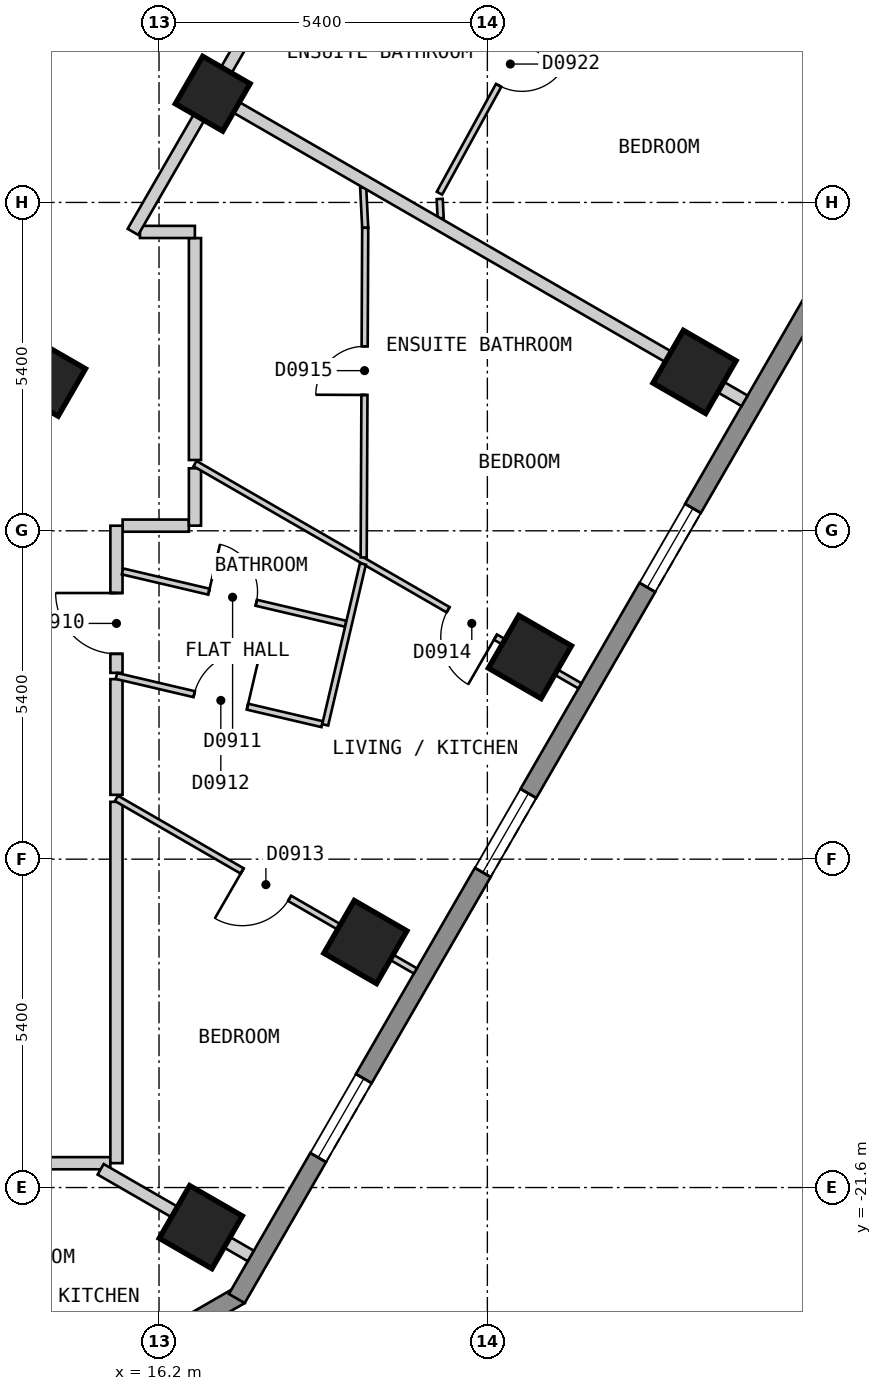
"""IFC4 building model, lengths in metres.
Left out: names, types, materials, properties, quantities, classifications, styles, units other than length and angle.
Written with IfcOpenShell. Run it as: python <this file> out.ifc"""

import sys

from ifc_helpers import new_model, si_unit, direction, frame, frame_2d, origin, origin_2d, place, context, subcontext, project, spatial, polyline, rectangle, outline, extrude, element, fill, save


model = new_model("IFC4")
c1 = context("Model", 3, precision=1e-05, world=origin(), true_north=direction((0.0, 1.0)))
c2 = subcontext(c1, "Body", "Model", "MODEL_VIEW")
j1 = project(units=[si_unit("LENGTHUNIT", "METRE"), si_unit("PLANEANGLEUNIT", "RADIAN")], contexts=[c1])
p1 = place(None, origin())
s1 = spatial("IfcSite", under=j1, at=p1, CompositionType="ELEMENT")
p2 = place(p1, origin())
s2 = spatial("IfcBuilding", under=s1, at=p2, CompositionType="ELEMENT")
p3 = place(p2, frame((0.0, 0.0, 102.0)))
s3 = spatial("IfcBuildingStorey", under=s2, at=p3, CompositionType="ELEMENT", Elevation=102.0)
for number, where, z_axis, x_axis in (
    (1, (16.887, -22.251, 0.0), (0.0, 0.0, 1.0), (0.5, 0.866, 0.0)),
    (2, (19.594, -17.563, 0.0), (0.0, 0.0, 1.0), (0.5, 0.866, 0.0)),
    (3, (22.3, -12.875, 0.0), (0.0, 0.0, 1.0), (0.5, 0.866, 0.0)),
    (4, (25.007, -8.187, 0.0), (0.0, 0.0, 1.0), (0.5, 0.866, 0.0)),
):
    element("IfcColumn", number, at=place(p3, frame(where, z_axis=z_axis, x_axis=x_axis)), inside=s3, PredefinedType="COLUMN", context=c2, shape_type="SweptSolid", body=[
        extrude(rectangle(XDim=1.0, YDim=1.0, at=origin_2d()), origin(), (0.0, 0.0, 1.0), 3.0),
    ])
for number, where, z_axis, x_axis in (
    (5, (14.376, -8.3, 0.0), (0.0, 0.0, 1.0), (0.5, 0.866, 0.0)),
    (6, (17.083, -3.612, 0.0), (0.0, 0.0, 1.0), (0.5, 0.866, 0.0)),
):
    element("IfcColumn", number, at=place(p3, frame(where, z_axis=z_axis, x_axis=x_axis)), inside=s3, PredefinedType="COLUMN", context=c2, shape_type="SweptSolid", body=[
        extrude(rectangle(XDim=0.9, YDim=0.9, at=origin_2d()), origin(), (0.0, 0.0, 1.0), 3.0),
    ])
p4 = place(p3, frame((13.204, -25.87, 0.0), z_axis=(0.0, 0.0, 1.0), x_axis=(0.866010750942, 0.50002537861, 0.0)))
e7 = element("IfcWall", 7, at=p4, inside=s3, PredefinedType="SOLIDWALL", context=c2, shape_type="SweptSolid", body=[
    extrude(outline(polyline([(0.0, -0.15), (5.0, -0.15), (4.919, 0.15), (0.08, 0.15), (0.0, -0.15)])), origin(), (0.0, 0.0, 1.0), 2.7),
])
p5 = place(p4, frame((0.65, 0.0, 0.15)))
e8 = element("IfcOpeningElement", 8, at=p5, cuts=e7, PredefinedType="OPENING", context=c2, shape_type="SweptSolid", body=[
    extrude(rectangle(XDim=1.2, YDim=2.1, at=frame_2d((0.6, 1.05))), frame((0.0, 0.16, 0.0), z_axis=(0.0, -1.0, 0.0), x_axis=(1.0, 0.0, 0.0)), (0.0, 0.0, 1.0), 0.32),
])
p6 = place(p3, frame((17.479, -23.425, 0.0), z_axis=(0.0, 0.0, 1.0), x_axis=(0.500035407905, 0.866004960056, 0.0)))
e9 = element("IfcWall", 9, at=p6, inside=s3, PredefinedType="SOLIDWALL", context=c2, shape_type="SweptSolid", body=[
    extrude(outline(polyline([(0.0, -0.15), (23.094, -0.15), (23.014, 0.15), (0.08, 0.15), (0.0, -0.15)])), origin(), (0.0, 0.0, 1.0), 2.7),
])
p7 = place(p6, frame((2.677, 0.0, 0.15)))
e10 = element("IfcOpeningElement", 10, at=p7, cuts=e9, PredefinedType="OPENING", context=c2, shape_type="SweptSolid", body=[
    extrude(rectangle(XDim=1.5, YDim=2.1, at=frame_2d((0.75, 1.05))), frame((0.0, 0.16, 0.0), z_axis=(0.0, -1.0, 0.0), x_axis=(1.0, 0.0, 0.0)), (0.0, 0.0, 1.0), 0.32),
])
p8 = place(p6, frame((8.091, 0.0, 0.15)))
e11 = element("IfcOpeningElement", 11, at=p8, cuts=e9, PredefinedType="OPENING", context=c2, shape_type="SweptSolid", body=[
    extrude(rectangle(XDim=1.5, YDim=2.1, at=frame_2d((0.75, 1.05))), frame((0.0, 0.16, 0.0), z_axis=(0.0, -1.0, 0.0), x_axis=(1.0, 0.0, 0.0)), (0.0, 0.0, 1.0), 0.32),
])
p9 = place(p6, frame((13.504, 0.0, 0.15)))
e12 = element("IfcOpeningElement", 12, at=p9, cuts=e9, PredefinedType="OPENING", context=c2, shape_type="SweptSolid", body=[
    extrude(rectangle(XDim=1.5, YDim=2.1, at=frame_2d((0.75, 1.05))), frame((0.0, 0.16, 0.0), z_axis=(0.0, -1.0, 0.0), x_axis=(1.0, 0.0, 0.0)), (0.0, 0.0, 1.0), 0.32),
])
p10 = place(p6, frame((18.917, 0.0, 0.15)))
e13 = element("IfcOpeningElement", 13, at=p10, cuts=e9, PredefinedType="OPENING", context=c2, shape_type="SweptSolid", body=[
    extrude(rectangle(XDim=1.5, YDim=2.1, at=frame_2d((0.75, 1.05))), frame((0.0, 0.16, 0.0), z_axis=(0.0, -1.0, 0.0), x_axis=(1.0, 0.0, 0.0)), (0.0, 0.0, 1.0), 0.32),
])
p11 = place(p3, frame((15.5, -13.239, 0.0), z_axis=(0.0, 0.0, 1.0), x_axis=(0.0, -1.0, 0.0)))
e14 = element("IfcWall", 14, at=p11, inside=s3, PredefinedType="PARTITIONING", context=c2, shape_type="SweptSolid", body=[
    extrude(rectangle(XDim=1.903, YDim=0.2, at=frame_2d((0.952, 0.0))), origin(), (0.0, 0.0, 1.0), 2.7),
])
p12 = place(p3, frame((16.791, -5.986, 0.0), z_axis=(0.0, 0.0, 1.0), x_axis=(0.0, -1.0, 0.0)))
e15 = element("IfcWall", 15, at=p12, inside=s3, PredefinedType="PARTITIONING", context=c2, shape_type="SweptSolid", body=[
    extrude(rectangle(XDim=3.65, YDim=0.2, at=frame_2d((1.825, 0.0))), origin(), (0.0, 0.0, 1.0), 2.7),
])
p13 = place(p3, frame((15.887, -5.885, 0.0), z_axis=(0.0, 0.0, 1.0), x_axis=(1.0, 0.0, 0.0)))
e16 = element("IfcWall", 16, at=p13, inside=s3, PredefinedType="PARTITIONING", context=c2, shape_type="SweptSolid", body=[
    extrude(rectangle(XDim=0.903, YDim=0.2, at=frame_2d((0.452, 0.0))), origin(), (0.0, 0.0, 1.0), 2.7),
])
p14 = place(p3, frame((15.601, -10.715, 0.0), z_axis=(0.0, 0.0, 1.0), x_axis=(1.0, 0.0, 0.0)))
e17 = element("IfcWall", 17, at=p14, inside=s3, PredefinedType="PARTITIONING", context=c2, shape_type="SweptSolid", body=[
    extrude(rectangle(XDim=1.09, YDim=0.2, at=frame_2d((0.545, 0.0))), origin(), (0.0, 0.0, 1.0), 2.7),
])
p15 = place(p3, frame((-15.499, -21.2, 0.0), z_axis=(0.0, 0.0, 1.0), x_axis=(1.0, 0.0, 0.0)))
e18 = element("IfcWall", 18, at=p15, inside=s3, PredefinedType="PARTITIONING", context=c2, shape_type="SweptSolid", body=[
    extrude(rectangle(XDim=30.898, YDim=0.2, at=frame_2d((15.449, 0.0))), origin(), (0.0, 0.0, 1.0), 2.7),
])
p16 = place(p15, frame((4.954, 0.0, 0.0)))
e19 = element("IfcOpeningElement", 19, at=p16, cuts=e18, PredefinedType="OPENING", context=c2, shape_type="SweptSolid", body=[
    extrude(rectangle(XDim=1.0, YDim=2.1, at=frame_2d((0.5, 1.05))), frame((0.0, 0.11, 0.0), z_axis=(0.0, -1.0, 0.0), x_axis=(1.0, 0.0, 0.0)), (0.0, 0.0, 1.0), 0.22),
])
p17 = place(p15, frame((25.046, 0.0, 0.0)))
e20 = element("IfcOpeningElement", 20, at=p17, cuts=e18, PredefinedType="OPENING", context=c2, shape_type="SweptSolid", body=[
    extrude(rectangle(XDim=1.0, YDim=2.1, at=frame_2d((0.5, 1.05))), frame((0.0, 0.11, 0.0), z_axis=(0.0, -1.0, 0.0), x_axis=(1.0, 0.0, 0.0)), (0.0, 0.0, 1.0), 0.22),
])
p18 = place(p3, frame((15.771, -5.884, 0.0), z_axis=(0.0, 0.0, 1.0), x_axis=(0.499939494019, 0.866060334111, 0.0)))
e21 = element("IfcWall", 21, at=p18, inside=s3, PredefinedType="PARTITIONING", context=c2, shape_type="SweptSolid", body=[
    extrude(rectangle(XDim=5.583, YDim=0.2, at=frame_2d((2.792, 0.0))), origin(), (0.0, 0.0, 1.0), 2.7),
])
p19 = place(p3, frame((15.5, -21.199, 0.0), z_axis=(0.0, 0.0, 1.0), x_axis=(0.0, 1.0, 0.0)))
e22 = element("IfcWall", 22, at=p19, inside=s3, PredefinedType="PARTITIONING", context=c2, shape_type="SweptSolid", body=[
    extrude(rectangle(XDim=5.942, YDim=0.2, at=frame_2d((2.971, 0.0))), origin(), (0.0, 0.0, 1.0), 2.7),
])
p20 = place(p3, frame((15.5, -13.136, 0.0), z_axis=(0.0, 0.0, 1.0), x_axis=(0.0, 1.0, 0.0)))
e23 = element("IfcWall", 23, at=p20, inside=s3, PredefinedType="PARTITIONING", context=c2, shape_type="SweptSolid", body=[
    extrude(rectangle(XDim=2.42, YDim=0.2, at=frame_2d((1.21, 0.0))), origin(), (0.0, 0.0, 1.0), 2.7),
])
p21 = place(p20, frame((0.313, 0.0, 0.0)))
e24 = element("IfcOpeningElement", 24, at=p21, cuts=e23, PredefinedType="OPENING", context=c2, shape_type="SweptSolid", body=[
    extrude(rectangle(XDim=1.0, YDim=2.1, at=frame_2d((0.5, 1.05))), frame((0.0, 0.11, 0.0), z_axis=(0.0, -1.0, 0.0), x_axis=(1.0, 0.0, 0.0)), (0.0, 0.0, 1.0), 0.22),
])
p22 = place(p3, frame((16.791, -10.715, 0.0), z_axis=(0.0, 0.0, 1.0), x_axis=(0.0, 1.0, 0.0)))
e25 = element("IfcWall", 25, at=p22, inside=s3, PredefinedType="PARTITIONING", context=c2, shape_type="SweptSolid", body=[
    extrude(rectangle(XDim=0.943, YDim=0.2, at=frame_2d((0.472, 0.0))), origin(), (0.0, 0.0, 1.0), 2.7),
])
p23 = place(p3, frame((19.558, -5.156, 0.0), z_axis=(0.0, 0.0, 1.0), x_axis=(0.04980880462, -0.998758771167, 0.0)))
e26 = element("IfcWall", 26, at=p23, inside=s3, PredefinedType="PARTITIONING", context=c2, shape_type="SweptSolid", body=[
    extrude(rectangle(XDim=0.662, YDim=0.1, at=frame_2d((0.331, 0.0))), origin(), (0.0, 0.0, 1.0), 2.7),
])
p24 = place(p3, frame((20.816, -5.343, 0.0), z_axis=(0.0, 0.0, 1.0), x_axis=(0.050626241319, -0.998717669659, 0.0)))
e27 = element("IfcWall", 27, at=p24, inside=s3, PredefinedType="PARTITIONING", context=c2, shape_type="SweptSolid", body=[
    extrude(rectangle(XDim=0.318, YDim=0.1, at=frame_2d((0.159, 0.0))), origin(), (0.0, 0.0, 1.0), 2.7),
])
p25 = place(p3, frame((15.6, -11.468, 0.0), z_axis=(0.0, 0.0, 1.0), x_axis=(0.973574036597, -0.228371616592, 0.0)))
e28 = element("IfcWall", 28, at=p25, inside=s3, PredefinedType="PARTITIONING", context=c2, shape_type="SweptSolid", body=[
    extrude(rectangle(XDim=3.771, YDim=0.1, at=frame_2d((1.885, 0.0))), origin(), (0.0, 0.0, 1.0), 2.7),
])
p26 = place(p25, frame((1.459, 0.0, 0.0)))
e29 = element("IfcOpeningElement", 29, at=p26, cuts=e28, PredefinedType="OPENING", context=c2, shape_type="SweptSolid", body=[
    extrude(rectangle(XDim=0.8, YDim=2.1, at=frame_2d((0.4, 1.05))), frame((0.0, 0.06, 0.0), z_axis=(0.0, -1.0, 0.0), x_axis=(1.0, 0.0, 0.0)), (0.0, 0.0, 1.0), 0.12),
])
p27 = place(p3, frame((15.5, -13.187, 0.0), z_axis=(0.0, 0.0, 1.0), x_axis=(0.973612163993, -0.228209014119, 0.0)))
e30 = element("IfcWall", 30, at=p27, inside=s3, PredefinedType="PARTITIONING", context=c2, shape_type="SweptSolid", body=[
    extrude(rectangle(XDim=3.475, YDim=0.1, at=frame_2d((1.737, 0.0))), origin(), (0.0, 0.0, 1.0), 2.7),
])
p28 = place(p27, frame((1.313, 0.0, 0.0)))
e31 = element("IfcOpeningElement", 31, at=p28, cuts=e30, PredefinedType="OPENING", context=c2, shape_type="SweptSolid", body=[
    extrude(rectangle(XDim=0.9, YDim=2.1, at=frame_2d((0.45, 1.05))), frame((0.0, 0.06, 0.0), z_axis=(0.0, -1.0, 0.0), x_axis=(1.0, 0.0, 0.0)), (0.0, 0.0, 1.0), 0.12),
])
p29 = place(p3, frame((15.5, -15.2, 0.0), z_axis=(0.0, 0.0, 1.0), x_axis=(0.866035181374, -0.499983064336, 0.0)))
e32 = element("IfcWall", 32, at=p29, inside=s3, PredefinedType="PARTITIONING", context=c2, shape_type="SweptSolid", body=[
    extrude(rectangle(XDim=5.677, YDim=0.1, at=frame_2d((2.838, 0.0))), origin(), (0.0, 0.0, 1.0), 2.7),
])
p30 = place(p29, frame((2.388, 0.0, 0.0)))
e33 = element("IfcOpeningElement", 33, at=p30, cuts=e32, PredefinedType="OPENING", context=c2, shape_type="SweptSolid", body=[
    extrude(rectangle(XDim=0.9, YDim=2.1, at=frame_2d((0.45, 1.05))), frame((0.0, 0.06, 0.0), z_axis=(0.0, -1.0, 0.0), x_axis=(1.0, 0.0, 0.0)), (0.0, 0.0, 1.0), 0.12),
])
p31 = place(p3, frame((16.792, -9.695, 0.0), z_axis=(0.0, 0.0, 1.0), x_axis=(0.86603765469, -0.499978780208, 0.0)))
e34 = element("IfcWall", 34, at=p31, inside=s3, PredefinedType="PARTITIONING", context=c2, shape_type="SweptSolid", body=[
    extrude(rectangle(XDim=7.31, YDim=0.1, at=frame_2d((3.655, 0.0))), origin(), (0.0, 0.0, 1.0), 2.7),
])
p32 = place(p31, frame((4.806, 0.0, 0.0)))
e35 = element("IfcOpeningElement", 35, at=p32, cuts=e34, PredefinedType="OPENING", context=c2, shape_type="SweptSolid", body=[
    extrude(rectangle(XDim=0.9, YDim=2.1, at=frame_2d((0.45, 1.05))), frame((0.0, 0.06, 0.0), z_axis=(0.0, -1.0, 0.0), x_axis=(1.0, 0.0, 0.0)), (0.0, 0.0, 1.0), 0.12),
])
p33 = place(p3, frame((20.812, -5.248, 0.0), z_axis=(0.0, 0.0, 1.0), x_axis=(0.481196609449, 0.876612698434, 0.0)))
e36 = element("IfcWall", 36, at=p33, inside=s3, PredefinedType="PARTITIONING", context=c2, shape_type="SweptSolid", body=[
    extrude(rectangle(XDim=4.79, YDim=0.1, at=frame_2d((2.395, 0.0))), origin(), (0.0, 0.0, 1.0), 2.7),
])
p34 = place(p33, frame((2.023, 0.0, 0.0)))
e37 = element("IfcOpeningElement", 37, at=p34, cuts=e36, PredefinedType="OPENING", context=c2, shape_type="SweptSolid", body=[
    extrude(rectangle(XDim=0.8, YDim=2.1, at=frame_2d((0.4, 1.05))), frame((0.0, 0.06, 0.0), z_axis=(0.0, -1.0, 0.0), x_axis=(1.0, 0.0, 0.0)), (0.0, 0.0, 1.0), 0.12),
])
p35 = place(p3, frame((18.933, -13.991, 0.0), z_axis=(0.0, 0.0, 1.0), x_axis=(0.228172687949, 0.97362067792, 0.0)))
e38 = element("IfcWall", 38, at=p35, inside=s3, PredefinedType="PARTITIONING", context=c2, shape_type="SweptSolid", body=[
    extrude(rectangle(XDim=2.717, YDim=0.1, at=frame_2d((1.358, 0.0))), origin(), (0.0, 0.0, 1.0), 2.7),
])
p36 = place(p3, frame((19.566, -11.238, 0.0), z_axis=(0.0, 0.0, 1.0), x_axis=(0.004638545009, 0.999989241892, 0.0)))
e39 = element("IfcWall", 39, at=p36, inside=s3, PredefinedType="PARTITIONING", context=c2, shape_type="SweptSolid", body=[
    extrude(rectangle(XDim=5.421, YDim=0.1, at=frame_2d((2.71, 0.0))), origin(), (0.0, 0.0, 1.0), 2.7),
])
p37 = place(p36, frame((2.672, 0.0, 0.0)))
e40 = element("IfcOpeningElement", 40, at=p37, cuts=e39, PredefinedType="OPENING", context=c2, shape_type="SweptSolid", body=[
    extrude(rectangle(XDim=0.8, YDim=2.1, at=frame_2d((0.4, 1.05))), frame((0.0, 0.06, 0.0), z_axis=(0.0, -1.0, 0.0), x_axis=(1.0, 0.0, 0.0)), (0.0, 0.0, 1.0), 0.12),
])
p38 = place(p3, frame((15.24, -21.3, 0.0), z_axis=(0.0, 0.0, 1.0), x_axis=(0.866090043625, -0.499888023795, 0.0)))
e41 = element("IfcWall", 41, at=p38, inside=s3, PredefinedType="PARTITIONING", context=c2, shape_type="SweptSolid", body=[
    extrude(rectangle(XDim=2.851, YDim=0.2, at=frame_2d((1.425, 0.0))), origin(), (0.0, 0.0, 1.0), 2.7),
])
p39 = place(p3, frame((17.169, -3.662, 0.0), z_axis=(0.0, 0.0, 1.0), x_axis=(0.866047370643, -0.499961950354, 0.0)))
e42 = element("IfcWall", 42, at=p39, inside=s3, PredefinedType="PARTITIONING", context=c2, shape_type="SweptSolid", body=[
    extrude(rectangle(XDim=10.001, YDim=0.2, at=frame_2d((5.0, 0.0))), origin(), (0.0, 0.0, 1.0), 2.7),
])
p40 = place(p7, origin())
e43 = element("IfcWindow", 43, at=p40, inside=s3, PartitioningType="SINGLE_PANEL", PredefinedType="WINDOW", context=c2, shape_type="SweptSolid", body=[
    extrude(rectangle(XDim=1.5, YDim=2.1, at=frame_2d((0.75, 1.05))), frame((0.0, 0.03, 0.0), z_axis=(0.0, -1.0, 0.0), x_axis=(1.0, 0.0, 0.0)), (0.0, 0.0, 1.0), 0.06),
])
fill(e10, e43)
p41 = place(p8, origin())
e44 = element("IfcWindow", 44, at=p41, inside=s3, PartitioningType="SINGLE_PANEL", PredefinedType="WINDOW", context=c2, shape_type="SweptSolid", body=[
    extrude(rectangle(XDim=1.5, YDim=2.1, at=frame_2d((0.75, 1.05))), frame((0.0, 0.03, 0.0), z_axis=(0.0, -1.0, 0.0), x_axis=(1.0, 0.0, 0.0)), (0.0, 0.0, 1.0), 0.06),
])
fill(e11, e44)
p42 = place(p9, origin())
e45 = element("IfcWindow", 45, at=p42, inside=s3, PartitioningType="SINGLE_PANEL", PredefinedType="WINDOW", context=c2, shape_type="SweptSolid", body=[
    extrude(rectangle(XDim=1.5, YDim=2.1, at=frame_2d((0.75, 1.05))), frame((0.0, 0.03, 0.0), z_axis=(0.0, -1.0, 0.0), x_axis=(1.0, 0.0, 0.0)), (0.0, 0.0, 1.0), 0.06),
])
fill(e12, e45)
p43 = place(p21, origin())
e46 = element("IfcDoor", 46, at=p43, inside=s3, OperationType="SINGLE_SWING_RIGHT", PredefinedType="DOOR", context=c2, shape_type="SweptSolid", body=[
    extrude(rectangle(XDim=1.0, YDim=2.1, at=frame_2d((0.5, 1.05))), frame((0.0, 0.025, 0.0), z_axis=(0.0, -1.0, 0.0), x_axis=(1.0, 0.0, 0.0)), (0.0, 0.0, 1.0), 0.05),
])
fill(e24, e46)
p44 = place(p26, origin())
e47 = element("IfcDoor", 47, at=p44, inside=s3, OperationType="SINGLE_SWING_LEFT", PredefinedType="DOOR", context=c2, shape_type="SweptSolid", body=[
    extrude(rectangle(XDim=0.8, YDim=2.1, at=frame_2d((0.4, 1.05))), frame((0.0, 0.025, 0.0), z_axis=(0.0, -1.0, 0.0), x_axis=(1.0, 0.0, 0.0)), (0.0, 0.0, 1.0), 0.05),
])
fill(e29, e47)
p45 = place(p28, origin())
e48 = element("IfcDoor", 48, at=p45, inside=s3, OperationType="SINGLE_SWING_RIGHT", PredefinedType="DOOR", context=c2, shape_type="SweptSolid", body=[
    extrude(rectangle(XDim=0.9, YDim=2.1, at=frame_2d((0.45, 1.05))), frame((0.0, 0.025, 0.0), z_axis=(0.0, -1.0, 0.0), x_axis=(1.0, 0.0, 0.0)), (0.0, 0.0, 1.0), 0.05),
])
fill(e31, e48)
p46 = place(p30, origin())
e49 = element("IfcDoor", 49, at=p46, inside=s3, OperationType="SINGLE_SWING_LEFT", PredefinedType="DOOR", context=c2, shape_type="SweptSolid", body=[
    extrude(rectangle(XDim=0.9, YDim=2.1, at=frame_2d((0.45, 1.05))), frame((0.0, 0.025, 0.0), z_axis=(0.0, -1.0, 0.0), x_axis=(1.0, 0.0, 0.0)), (0.0, 0.0, 1.0), 0.05),
])
fill(e33, e49)
p47 = place(p32, origin())
e50 = element("IfcDoor", 50, at=p47, inside=s3, OperationType="SINGLE_SWING_RIGHT", PredefinedType="DOOR", context=c2, shape_type="SweptSolid", body=[
    extrude(rectangle(XDim=0.9, YDim=2.1, at=frame_2d((0.45, 1.05))), frame((0.0, 0.025, 0.0), z_axis=(0.0, -1.0, 0.0), x_axis=(1.0, 0.0, 0.0)), (0.0, 0.0, 1.0), 0.05),
])
fill(e35, e50)
p48 = place(p37, origin())
e51 = element("IfcDoor", 51, at=p48, inside=s3, OperationType="SINGLE_SWING_LEFT", PredefinedType="DOOR", context=c2, shape_type="SweptSolid", body=[
    extrude(rectangle(XDim=0.8, YDim=2.1, at=frame_2d((0.4, 1.05))), frame((0.0, 0.025, 0.0), z_axis=(0.0, -1.0, 0.0), x_axis=(1.0, 0.0, 0.0)), (0.0, 0.0, 1.0), 0.05),
])
fill(e40, e51)
p49 = place(p34, origin())
e52 = element("IfcDoor", 52, at=p49, inside=s3, OperationType="SINGLE_SWING_RIGHT", PredefinedType="DOOR", context=c2, shape_type="SweptSolid", body=[
    extrude(rectangle(XDim=0.8, YDim=2.1, at=frame_2d((0.4, 1.05))), frame((0.0, 0.025, 0.0), z_axis=(0.0, -1.0, 0.0), x_axis=(1.0, 0.0, 0.0)), (0.0, 0.0, 1.0), 0.05),
])
fill(e37, e52)
save(model, sys.argv[1])
